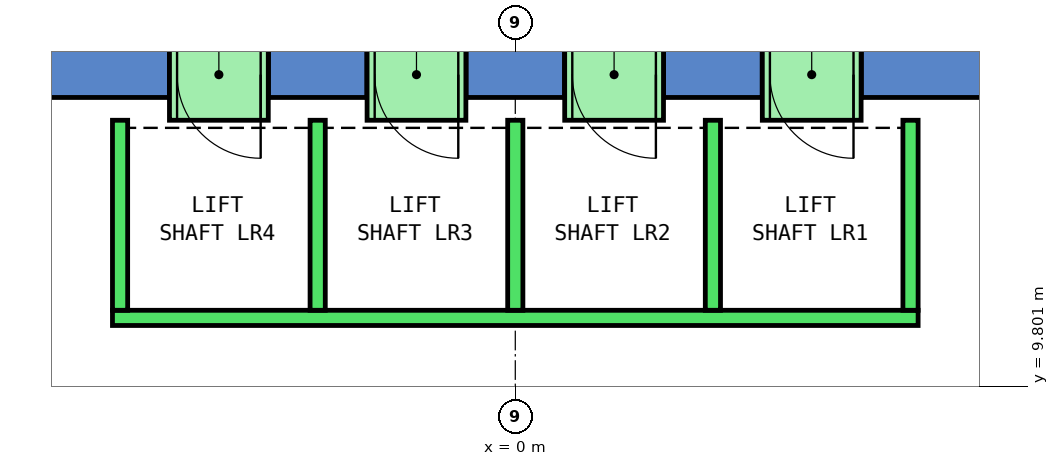
"""IFC4 building model, lengths in metres.
Left out: names, types, materials, properties, quantities, classifications, styles, units other than length and angle.
Written with IfcOpenShell. Run it as: python <this file> out.ifc"""

import sys

from ifc_helpers import new_model, si_unit, direction, frame, frame_2d, origin, place, context, subcontext, project, spatial, polyline, rectangle, outline, extrude, element, fill, save


model = new_model("IFC4")
c1 = context("Model", 3, precision=1e-05, world=origin(), true_north=direction((0.0, 1.0)))
c2 = subcontext(c1, "Body", "Model", "MODEL_VIEW")
j1 = project(units=[si_unit("LENGTHUNIT", "METRE"), si_unit("PLANEANGLEUNIT", "RADIAN")], contexts=[c1])
p1 = place(None, origin())
s1 = spatial("IfcSite", under=j1, at=p1, CompositionType="ELEMENT")
p2 = place(p1, origin())
s2 = spatial("IfcBuilding", under=s1, at=p2, CompositionType="ELEMENT")
p3 = place(p2, frame((0.0, 0.0, 116.0)))
s3 = spatial("IfcBuildingStorey", under=s2, at=p3, CompositionType="ELEMENT", Elevation=116.0)
p4 = place(p3, frame((0.0, 0.0, -0.4)))
e1 = element("IfcWall", 1, at=p4, inside=s3, PredefinedType="SHEAR", context=c2, shape_type="SweptSolid", body=[
    extrude(outline(polyline([(4.55, 14.5), (4.55, 13.6), (6.409, 13.6), (6.928, 14.5), (4.55, 14.5)])), origin(), (0.0, 0.0, 1.0), 4.2),
])
p5 = place(p3, frame((0.0, 0.0, -0.4)))
e2 = element("IfcWall", 2, at=p5, inside=s3, PredefinedType="SHEAR", context=c2, shape_type="SweptSolid", body=[
    extrude(outline(polyline([(1.95, 14.5), (1.95, 13.6), (3.25, 13.6), (3.25, 14.5), (1.95, 14.5)])), origin(), (0.0, 0.0, 1.0), 4.2),
])
p6 = place(p3, frame((0.0, 0.0, -0.4)))
e3 = element("IfcWall", 3, at=p6, inside=s3, PredefinedType="SHEAR", context=c2, shape_type="SweptSolid", body=[
    extrude(outline(polyline([(-0.65, 14.5), (-0.65, 13.6), (0.65, 13.6), (0.65, 14.5), (-0.65, 14.5)])), origin(), (0.0, 0.0, 1.0), 4.2),
])
p7 = place(p3, frame((0.0, 0.0, -0.4)))
e4 = element("IfcWall", 4, at=p7, inside=s3, PredefinedType="SHEAR", context=c2, shape_type="SweptSolid", body=[
    extrude(outline(polyline([(-3.25, 14.5), (-3.25, 13.6), (-1.95, 13.6), (-1.95, 14.5), (-3.25, 14.5)])), origin(), (0.0, 0.0, 1.0), 4.2),
])
p8 = place(p3, frame((0.0, 0.0, -0.4)))
e5 = element("IfcWall", 5, at=p8, inside=s3, PredefinedType="SHEAR", context=c2, shape_type="SweptSolid", body=[
    extrude(outline(polyline([(-4.55, 13.6), (-4.55, 14.5), (-6.928, 14.5), (-6.409, 13.6), (-4.55, 13.6)])), origin(), (0.0, 0.0, 1.0), 4.2),
])
p9 = place(p3, frame((0.0, 0.0, 3.6)))
e6 = element("IfcWall", 6, at=p9, inside=s3, PredefinedType="SHEAR", context=c2, shape_type="SweptSolid", body=[
    extrude(outline(polyline([(3.25, 14.5), (3.25, 13.6), (4.55, 13.6), (4.55, 14.5), (3.25, 14.5)])), origin(), (0.0, 0.0, 1.0), 0.2),
])
p10 = place(p3, frame((0.0, 0.0, 3.6)))
e7 = element("IfcWall", 7, at=p10, inside=s3, PredefinedType="SHEAR", context=c2, shape_type="SweptSolid", body=[
    extrude(outline(polyline([(0.65, 14.5), (0.65, 13.6), (1.95, 13.6), (1.95, 14.5), (0.65, 14.5)])), origin(), (0.0, 0.0, 1.0), 0.2),
])
p11 = place(p3, frame((0.0, 0.0, 3.6)))
e8 = element("IfcWall", 8, at=p11, inside=s3, PredefinedType="SHEAR", context=c2, shape_type="SweptSolid", body=[
    extrude(outline(polyline([(-1.95, 14.5), (-1.95, 13.6), (-0.65, 13.6), (-0.65, 14.5), (-1.95, 14.5)])), origin(), (0.0, 0.0, 1.0), 0.2),
])
p12 = place(p3, frame((0.0, 0.0, 3.6)))
e9 = element("IfcWall", 9, at=p12, inside=s3, PredefinedType="SHEAR", context=c2, shape_type="SweptSolid", body=[
    extrude(outline(polyline([(-4.55, 14.5), (-4.55, 13.6), (-3.25, 13.6), (-3.25, 14.5), (-4.55, 14.5)])), origin(), (0.0, 0.0, 1.0), 0.2),
])
p13 = place(p3, frame((5.3, 10.7, 0.0), z_axis=(0.0, 0.0, 1.0), x_axis=(-1.0, 0.0, 0.0)))
e10 = element("IfcWall", 10, at=p13, inside=s3, PredefinedType="STANDARD", context=c2, shape_type="SweptSolid", body=[
    extrude(rectangle(XDim=10.6, YDim=0.2, at=frame_2d((5.3, 0.0))), origin(), (0.0, 0.0, 1.0), 3.8),
])
for number, where, z_axis, x_axis in (
    (11, (5.2, 10.8, 0.0), (0.0, 0.0, 1.0), (0.0, 1.0, 0.0)),
    (12, (2.6, 10.8, 0.0), (0.0, 0.0, 1.0), (0.0, 1.0, 0.0)),
    (13, (0.0, 10.8, 0.0), (0.0, 0.0, 1.0), (0.0, 1.0, 0.0)),
    (14, (-2.6, 10.8, 0.0), (0.0, 0.0, 1.0), (0.0, 1.0, 0.0)),
    (15, (-5.2, 10.8, 0.0), (0.0, 0.0, 1.0), (0.0, 1.0, 0.0)),
):
    element("IfcWall", number, at=place(p3, frame(where, z_axis=z_axis, x_axis=x_axis)), inside=s3, PredefinedType="STANDARD", context=c2, shape_type="SweptSolid", body=[
        extrude(rectangle(XDim=2.5, YDim=0.2, at=frame_2d((1.25, 0.0))), origin(), (0.0, 0.0, 1.0), 3.8),
    ])
p14 = place(p3, frame((4.55, 13.9, 0.0), z_axis=(0.0, 0.0, 1.0), x_axis=(-1.0, 0.0, 0.0)))
e16 = element("IfcWall", 16, at=p14, inside=s3, PredefinedType="STANDARD", context=c2, shape_type="SweptSolid", body=[
    extrude(rectangle(XDim=1.3, YDim=1.2, at=frame_2d((0.65, 0.0))), origin(), (0.0, 0.0, 1.0), 2.4),
])
p15 = place(p14, frame((0.1, 0.0, 0.0)))
e17 = element("IfcOpeningElement", 17, at=p15, cuts=e16, PredefinedType="OPENING", context=c2, shape_type="SweptSolid", body=[
    extrude(rectangle(XDim=1.1, YDim=2.3, at=frame_2d((0.55, 1.15))), frame((0.0, 0.61, 0.0), z_axis=(0.0, -1.0, 0.0), x_axis=(1.0, 0.0, 0.0)), (0.0, 0.0, 1.0), 1.22),
])
p16 = place(p3, frame((1.95, 13.9, 0.0), z_axis=(0.0, 0.0, 1.0), x_axis=(-1.0, 0.0, 0.0)))
e18 = element("IfcWall", 18, at=p16, inside=s3, PredefinedType="STANDARD", context=c2, shape_type="SweptSolid", body=[
    extrude(rectangle(XDim=1.3, YDim=1.2, at=frame_2d((0.65, 0.0))), origin(), (0.0, 0.0, 1.0), 2.4),
])
p17 = place(p16, frame((0.1, 0.0, 0.0)))
e19 = element("IfcOpeningElement", 19, at=p17, cuts=e18, PredefinedType="OPENING", context=c2, shape_type="SweptSolid", body=[
    extrude(rectangle(XDim=1.1, YDim=2.3, at=frame_2d((0.55, 1.15))), frame((0.0, 0.61, 0.0), z_axis=(0.0, -1.0, 0.0), x_axis=(1.0, 0.0, 0.0)), (0.0, 0.0, 1.0), 1.22),
])
p18 = place(p3, frame((-0.65, 13.9, 0.0), z_axis=(0.0, 0.0, 1.0), x_axis=(-1.0, 0.0, 0.0)))
e20 = element("IfcWall", 20, at=p18, inside=s3, PredefinedType="STANDARD", context=c2, shape_type="SweptSolid", body=[
    extrude(rectangle(XDim=1.3, YDim=1.2, at=frame_2d((0.65, 0.0))), origin(), (0.0, 0.0, 1.0), 2.4),
])
p19 = place(p18, frame((0.1, 0.0, 0.0)))
e21 = element("IfcOpeningElement", 21, at=p19, cuts=e20, PredefinedType="OPENING", context=c2, shape_type="SweptSolid", body=[
    extrude(rectangle(XDim=1.1, YDim=2.3, at=frame_2d((0.55, 1.15))), frame((0.0, 0.61, 0.0), z_axis=(0.0, -1.0, 0.0), x_axis=(1.0, 0.0, 0.0)), (0.0, 0.0, 1.0), 1.22),
])
p20 = place(p3, frame((-3.25, 13.9, 0.0), z_axis=(0.0, 0.0, 1.0), x_axis=(-1.0, 0.0, 0.0)))
e22 = element("IfcWall", 22, at=p20, inside=s3, PredefinedType="STANDARD", context=c2, shape_type="SweptSolid", body=[
    extrude(rectangle(XDim=1.3, YDim=1.2, at=frame_2d((0.65, 0.0))), origin(), (0.0, 0.0, 1.0), 2.4),
])
p21 = place(p20, frame((0.1, 0.0, 0.0)))
e23 = element("IfcOpeningElement", 23, at=p21, cuts=e22, PredefinedType="OPENING", context=c2, shape_type="SweptSolid", body=[
    extrude(rectangle(XDim=1.1, YDim=2.3, at=frame_2d((0.55, 1.15))), frame((0.0, 0.61, 0.0), z_axis=(0.0, -1.0, 0.0), x_axis=(1.0, 0.0, 0.0)), (0.0, 0.0, 1.0), 1.22),
])
p22 = place(p15, origin())
e24 = element("IfcDoor", 24, at=p22, inside=s3, OperationType="SLIDING_TO_LEFT", PredefinedType="DOOR", context=c2, shape_type="SweptSolid", body=[
    extrude(rectangle(XDim=1.1, YDim=2.3, at=frame_2d((0.55, 1.15))), frame((0.0, 0.025, 0.0), z_axis=(0.0, -1.0, 0.0), x_axis=(1.0, 0.0, 0.0)), (0.0, 0.0, 1.0), 0.05),
])
fill(e17, e24)
p23 = place(p17, origin())
e25 = element("IfcDoor", 25, at=p23, inside=s3, OperationType="SLIDING_TO_LEFT", PredefinedType="DOOR", context=c2, shape_type="SweptSolid", body=[
    extrude(rectangle(XDim=1.1, YDim=2.3, at=frame_2d((0.55, 1.15))), frame((0.0, 0.025, 0.0), z_axis=(0.0, -1.0, 0.0), x_axis=(1.0, 0.0, 0.0)), (0.0, 0.0, 1.0), 0.05),
])
fill(e19, e25)
p24 = place(p19, origin())
e26 = element("IfcDoor", 26, at=p24, inside=s3, OperationType="SLIDING_TO_LEFT", PredefinedType="DOOR", context=c2, shape_type="SweptSolid", body=[
    extrude(rectangle(XDim=1.1, YDim=2.3, at=frame_2d((0.55, 1.15))), frame((0.0, 0.025, 0.0), z_axis=(0.0, -1.0, 0.0), x_axis=(1.0, 0.0, 0.0)), (0.0, 0.0, 1.0), 0.05),
])
fill(e21, e26)
p25 = place(p21, origin())
e27 = element("IfcDoor", 27, at=p25, inside=s3, OperationType="SLIDING_TO_LEFT", PredefinedType="DOOR", context=c2, shape_type="SweptSolid", body=[
    extrude(rectangle(XDim=1.1, YDim=2.3, at=frame_2d((0.55, 1.15))), frame((0.0, 0.025, 0.0), z_axis=(0.0, -1.0, 0.0), x_axis=(1.0, 0.0, 0.0)), (0.0, 0.0, 1.0), 0.05),
])
fill(e23, e27)
save(model, sys.argv[1])
